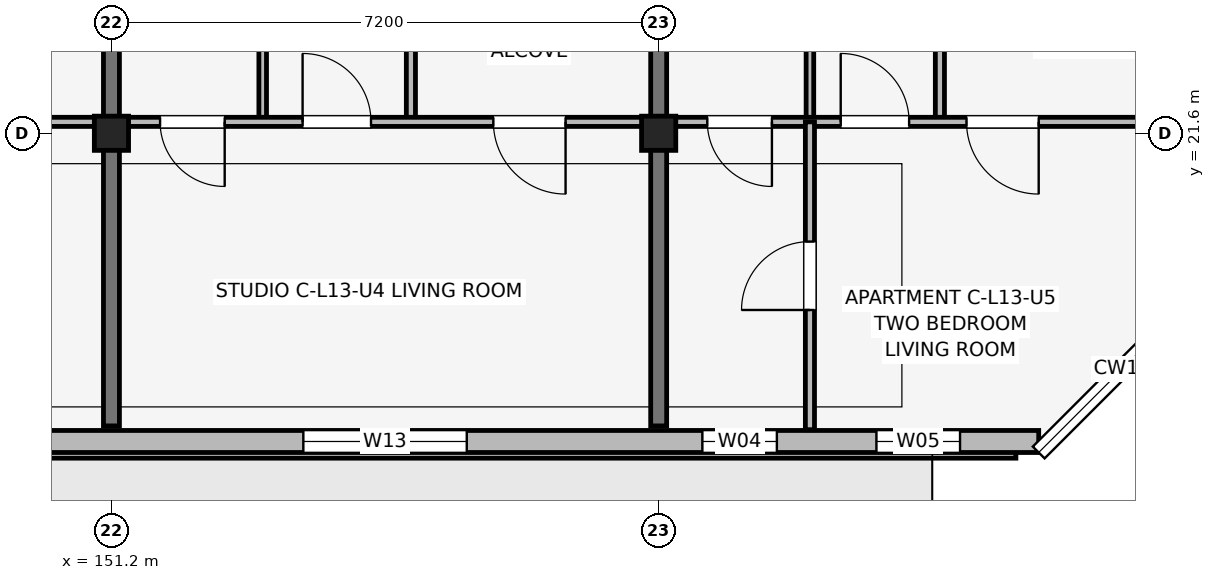
"""IFC4 building model, lengths in metres.
Left out: names, types, materials, properties, quantities, classifications, styles, units other than length and angle.
Written with IfcOpenShell. Run it as: python <this file> out.ifc"""

import sys

from ifc_helpers import new_model, si_unit, direction, frame, frame_2d, origin, origin_2d, place, context, subcontext, project, spatial, rectangle, extrude, element, fill, save


model = new_model("IFC4")
c1 = context("Model", 3, precision=1e-05, world=origin(), true_north=direction((0.0, 1.0)))
c2 = subcontext(c1, "Body", "Model", "MODEL_VIEW")
j1 = project(units=[si_unit("LENGTHUNIT", "METRE"), si_unit("PLANEANGLEUNIT", "RADIAN")], contexts=[c1])
p1 = place(None, origin())
s1 = spatial("IfcSite", under=j1, at=p1, CompositionType="ELEMENT")
p2 = place(p1, origin())
s2 = spatial("IfcBuilding", under=s1, at=p2, CompositionType="ELEMENT")
p3 = place(p2, frame((0.0, 0.0, 43.35)))
s3 = spatial("IfcBuildingStorey", under=s2, at=p3, CompositionType="ELEMENT", Elevation=43.35)
for number, where, z_axis, x_axis in (
    (1, (151.2, 21.6, 0.0), (0.0, 0.0, 1.0), (1.0, 0.0, 0.0)),
    (2, (158.4, 21.6, 0.0), (0.0, 0.0, 1.0), (1.0, 0.0, 0.0)),
):
    element("IfcColumn", number, at=place(p3, frame(where, z_axis=z_axis, x_axis=x_axis)), inside=s3, PredefinedType="COLUMN", context=c2, shape_type="SweptSolid", body=[
        extrude(rectangle(XDim=0.45, YDim=0.45, at=origin_2d()), origin(), (0.0, 0.0, 1.0), 3.15),
    ])
for number, where, z_axis, x_axis in (
    (3, (151.2, 17.75, 0.0), (0.0, 0.0, 1.0), (0.0, 1.0, 0.0)),
    (4, (158.4, 17.75, 0.0), (0.0, 0.0, 1.0), (0.0, 1.0, 0.0)),
):
    element("IfcWall", number, at=place(p3, frame(where, z_axis=z_axis, x_axis=x_axis)), inside=s3, PredefinedType="SHEAR", context=c2, shape_type="SweptSolid", body=[
        extrude(rectangle(XDim=6.4, YDim=0.21, at=frame_2d((3.2, 0.0))), origin(), (0.0, 0.0, 1.0), 3.15),
    ])
p4 = place(p3, frame((131.8, 17.545, 0.0), z_axis=(0.0, 0.0, 1.0), x_axis=(1.0, 0.0, 0.0)))
e5 = element("IfcWall", 5, at=p4, inside=s3, PredefinedType="SOLIDWALL", context=c2, shape_type="SweptSolid", body=[
    extrude(rectangle(XDim=31.6, YDim=0.29, at=frame_2d((15.8, 0.0))), origin(), (0.0, 0.0, 1.0), 2.48),
])
p5 = place(p4, frame((18.35, 0.0, 0.0), z_axis=(0.0, 0.0, 1.0), x_axis=(-1.0, 0.0, 0.0)))
e6 = element("IfcOpeningElement", 6, at=p5, cuts=e5, PredefinedType="OPENING", context=c2, shape_type="SweptSolid", body=[
    extrude(rectangle(XDim=1.9, YDim=2.2, at=frame_2d((0.95, 1.1))), frame((0.0, 0.155, 0.0), z_axis=(0.0, -1.0, 0.0), x_axis=(1.0, 0.0, 0.0)), (0.0, 0.0, 1.0), 0.31),
])
p6 = place(p4, frame((1.65, 0.0, 0.7)))
e7 = element("IfcOpeningElement", 7, at=p6, cuts=e5, PredefinedType="OPENING", context=c2, shape_type="SweptSolid", body=[
    extrude(rectangle(XDim=1.72, YDim=1.6, at=frame_2d((0.86, 0.8))), frame((0.0, 0.155, 0.0), z_axis=(0.0, -1.0, 0.0), x_axis=(1.0, 0.0, 0.0)), (0.0, 0.0, 1.0), 0.31),
])
p7 = place(p4, frame((5.89, 0.0, 0.75)))
e8 = element("IfcOpeningElement", 8, at=p7, cuts=e5, PredefinedType="OPENING", context=c2, shape_type="SweptSolid", body=[
    extrude(rectangle(XDim=0.6, YDim=1.25, at=frame_2d((0.3, 0.625))), frame((0.0, 0.155, 0.0), z_axis=(0.0, -1.0, 0.0), x_axis=(1.0, 0.0, 0.0)), (0.0, 0.0, 1.0), 0.31),
])
p8 = place(p4, frame((8.65, 0.0, 0.7)))
e9 = element("IfcOpeningElement", 9, at=p8, cuts=e5, PredefinedType="OPENING", context=c2, shape_type="SweptSolid", body=[
    extrude(rectangle(XDim=2.0, YDim=1.65, at=frame_2d((1.0, 0.825))), frame((0.0, 0.155, 0.0), z_axis=(0.0, -1.0, 0.0), x_axis=(1.0, 0.0, 0.0)), (0.0, 0.0, 1.0), 0.31),
])
p9 = place(p4, frame((21.925, 0.0, 0.7)))
e10 = element("IfcOpeningElement", 10, at=p9, cuts=e5, PredefinedType="OPENING", context=c2, shape_type="SweptSolid", body=[
    extrude(rectangle(XDim=2.15, YDim=1.65, at=frame_2d((1.075, 0.825))), frame((0.0, 0.155, 0.0), z_axis=(0.0, -1.0, 0.0), x_axis=(1.0, 0.0, 0.0)), (0.0, 0.0, 1.0), 0.31),
])
p10 = place(p4, frame((27.175, 0.0, 0.75)))
e11 = element("IfcOpeningElement", 11, at=p10, cuts=e5, PredefinedType="OPENING", context=c2, shape_type="SweptSolid", body=[
    extrude(rectangle(XDim=0.98, YDim=1.45, at=frame_2d((0.49, 0.725))), frame((0.0, 0.155, 0.0), z_axis=(0.0, -1.0, 0.0), x_axis=(1.0, 0.0, 0.0)), (0.0, 0.0, 1.0), 0.31),
])
p11 = place(p4, frame((29.465, 0.0, 0.75)))
e12 = element("IfcOpeningElement", 12, at=p11, cuts=e5, PredefinedType="OPENING", context=c2, shape_type="SweptSolid", body=[
    extrude(rectangle(XDim=1.1, YDim=1.5, at=frame_2d((0.55, 0.75))), frame((0.0, 0.155, 0.0), z_axis=(0.0, -1.0, 0.0), x_axis=(1.0, 0.0, 0.0)), (0.0, 0.0, 1.0), 0.31),
])
p12 = place(p3, frame((144.14, 21.75, 0.0), z_axis=(0.0, 0.0, 1.0), x_axis=(1.0, 0.0, 0.0)))
e13 = element("IfcWall", 13, at=p12, inside=s3, PredefinedType="PARTITIONING", context=c2, shape_type="SweptSolid", body=[
    extrude(rectangle(XDim=6.92, YDim=0.12, at=frame_2d((3.46, 0.0))), origin(), (0.0, 0.0, 1.0), 2.38),
])
p13 = place(p12, frame((1.475, 0.0, 0.0), z_axis=(0.0, 0.0, 1.0), x_axis=(-1.0, 0.0, 0.0)))
e14 = element("IfcOpeningElement", 14, at=p13, cuts=e13, PredefinedType="OPENING", context=c2, shape_type="SweptSolid", body=[
    extrude(rectangle(XDim=0.85, YDim=2.08, at=frame_2d((0.425, 1.04))), frame((0.0, 0.07, 0.0), z_axis=(0.0, -1.0, 0.0), x_axis=(1.0, 0.0, 0.0)), (0.0, 0.0, 1.0), 0.14),
])
p14 = place(p12, frame((2.625, 0.0, 0.0)))
e15 = element("IfcOpeningElement", 15, at=p14, cuts=e13, PredefinedType="OPENING", context=c2, shape_type="SweptSolid", body=[
    extrude(rectangle(XDim=0.9, YDim=2.08, at=frame_2d((0.45, 1.04))), frame((0.0, 0.07, 0.0), z_axis=(0.0, -1.0, 0.0), x_axis=(1.0, 0.0, 0.0)), (0.0, 0.0, 1.0), 0.14),
])
p15 = place(p12, frame((5.96, 0.0, 0.0), z_axis=(0.0, 0.0, 1.0), x_axis=(-1.0, 0.0, 0.0)))
e16 = element("IfcOpeningElement", 16, at=p15, cuts=e13, PredefinedType="OPENING", context=c2, shape_type="SweptSolid", body=[
    extrude(rectangle(XDim=0.95, YDim=2.08, at=frame_2d((0.475, 1.04))), frame((0.0, 0.07, 0.0), z_axis=(0.0, -1.0, 0.0), x_axis=(1.0, 0.0, 0.0)), (0.0, 0.0, 1.0), 0.14),
])
p16 = place(p3, frame((153.19, 21.75, 0.0), z_axis=(0.0, 0.0, 1.0), x_axis=(0.0, 1.0, 0.0)))
e17 = element("IfcWall", 17, at=p16, inside=s3, PredefinedType="PARTITIONING", context=c2, shape_type="SweptSolid", body=[
    extrude(rectangle(XDim=2.55, YDim=0.1, at=frame_2d((1.275, 0.0))), origin(), (0.0, 0.0, 1.0), 2.38),
])
p17 = place(p3, frame((155.14, 21.75, 0.0), z_axis=(0.0, 0.0, 1.0), x_axis=(0.0, 1.0, 0.0)))
e18 = element("IfcWall", 18, at=p17, inside=s3, PredefinedType="PARTITIONING", context=c2, shape_type="SweptSolid", body=[
    extrude(rectangle(XDim=2.55, YDim=0.12, at=frame_2d((1.275, 0.0))), origin(), (0.0, 0.0, 1.0), 2.38),
])
p18 = place(p3, frame((151.34, 21.75, 0.0), z_axis=(0.0, 0.0, 1.0), x_axis=(1.0, 0.0, 0.0)))
e19 = element("IfcWall", 19, at=p18, inside=s3, PredefinedType="PARTITIONING", context=c2, shape_type="SweptSolid", body=[
    extrude(rectangle(XDim=6.92, YDim=0.12, at=frame_2d((3.46, 0.0))), origin(), (0.0, 0.0, 1.0), 2.38),
])
p19 = place(p18, frame((1.35, 0.0, 0.0), z_axis=(0.0, 0.0, 1.0), x_axis=(-1.0, 0.0, 0.0)))
e20 = element("IfcOpeningElement", 20, at=p19, cuts=e19, PredefinedType="OPENING", context=c2, shape_type="SweptSolid", body=[
    extrude(rectangle(XDim=0.85, YDim=2.08, at=frame_2d((0.425, 1.04))), frame((0.0, 0.07, 0.0), z_axis=(0.0, -1.0, 0.0), x_axis=(1.0, 0.0, 0.0)), (0.0, 0.0, 1.0), 0.14),
])
p20 = place(p18, frame((2.375, 0.0, 0.0)))
e21 = element("IfcOpeningElement", 21, at=p20, cuts=e19, PredefinedType="OPENING", context=c2, shape_type="SweptSolid", body=[
    extrude(rectangle(XDim=0.9, YDim=2.08, at=frame_2d((0.45, 1.04))), frame((0.0, 0.07, 0.0), z_axis=(0.0, -1.0, 0.0), x_axis=(1.0, 0.0, 0.0)), (0.0, 0.0, 1.0), 0.14),
])
p21 = place(p18, frame((5.835, 0.0, 0.0), z_axis=(0.0, 0.0, 1.0), x_axis=(-1.0, 0.0, 0.0)))
e22 = element("IfcOpeningElement", 22, at=p21, cuts=e19, PredefinedType="OPENING", context=c2, shape_type="SweptSolid", body=[
    extrude(rectangle(XDim=0.95, YDim=2.08, at=frame_2d((0.475, 1.04))), frame((0.0, 0.07, 0.0), z_axis=(0.0, -1.0, 0.0), x_axis=(1.0, 0.0, 0.0)), (0.0, 0.0, 1.0), 0.14),
])
p22 = place(p3, frame((160.39, 21.75, 0.0), z_axis=(0.0, 0.0, 1.0), x_axis=(0.0, 1.0, 0.0)))
e23 = element("IfcWall", 23, at=p22, inside=s3, PredefinedType="PARTITIONING", context=c2, shape_type="SweptSolid", body=[
    extrude(rectangle(XDim=2.55, YDim=0.1, at=frame_2d((1.275, 0.0))), origin(), (0.0, 0.0, 1.0), 2.38),
])
p23 = place(p3, frame((162.1, 21.75, 0.0), z_axis=(0.0, 0.0, 1.0), x_axis=(0.0, 1.0, 0.0)))
e24 = element("IfcWall", 24, at=p23, inside=s3, PredefinedType="PARTITIONING", context=c2, shape_type="SweptSolid", body=[
    extrude(rectangle(XDim=2.55, YDim=0.12, at=frame_2d((1.275, 0.0))), origin(), (0.0, 0.0, 1.0), 2.38),
])
p24 = place(p3, frame((158.54, 21.75, 0.0), z_axis=(0.0, 0.0, 1.0), x_axis=(1.0, 0.0, 0.0)))
e25 = element("IfcWall", 25, at=p24, inside=s3, PredefinedType="PARTITIONING", context=c2, shape_type="SweptSolid", body=[
    extrude(rectangle(XDim=6.92, YDim=0.12, at=frame_2d((3.46, 0.0))), origin(), (0.0, 0.0, 1.0), 2.38),
])
p25 = place(p24, frame((1.35, 0.0, 0.0), z_axis=(0.0, 0.0, 1.0), x_axis=(-1.0, 0.0, 0.0)))
e26 = element("IfcOpeningElement", 26, at=p25, cuts=e25, PredefinedType="OPENING", context=c2, shape_type="SweptSolid", body=[
    extrude(rectangle(XDim=0.85, YDim=2.08, at=frame_2d((0.425, 1.04))), frame((0.0, 0.07, 0.0), z_axis=(0.0, -1.0, 0.0), x_axis=(1.0, 0.0, 0.0)), (0.0, 0.0, 1.0), 0.14),
])
p26 = place(p24, frame((2.255, 0.0, 0.0)))
e27 = element("IfcOpeningElement", 27, at=p26, cuts=e25, PredefinedType="OPENING", context=c2, shape_type="SweptSolid", body=[
    extrude(rectangle(XDim=0.9, YDim=2.08, at=frame_2d((0.45, 1.04))), frame((0.0, 0.07, 0.0), z_axis=(0.0, -1.0, 0.0), x_axis=(1.0, 0.0, 0.0)), (0.0, 0.0, 1.0), 0.14),
])
p27 = place(p24, frame((4.86, 0.0, 0.0), z_axis=(0.0, 0.0, 1.0), x_axis=(-1.0, 0.0, 0.0)))
e28 = element("IfcOpeningElement", 28, at=p27, cuts=e25, PredefinedType="OPENING", context=c2, shape_type="SweptSolid", body=[
    extrude(rectangle(XDim=0.95, YDim=2.08, at=frame_2d((0.475, 1.04))), frame((0.0, 0.07, 0.0), z_axis=(0.0, -1.0, 0.0), x_axis=(1.0, 0.0, 0.0)), (0.0, 0.0, 1.0), 0.14),
])
p28 = place(p3, frame((160.39, 17.7, 0.0), z_axis=(0.0, 0.0, 1.0), x_axis=(0.0, 1.0, 0.0)))
e29 = element("IfcWall", 29, at=p28, inside=s3, PredefinedType="PARTITIONING", context=c2, shape_type="SweptSolid", body=[
    extrude(rectangle(XDim=4.05, YDim=0.12, at=frame_2d((2.025, 0.0))), origin(), (0.0, 0.0, 1.0), 2.38),
])
p29 = place(p28, frame((1.575, 0.0, 0.0)))
e30 = element("IfcOpeningElement", 30, at=p29, cuts=e29, PredefinedType="OPENING", context=c2, shape_type="SweptSolid", body=[
    extrude(rectangle(XDim=0.9, YDim=2.08, at=frame_2d((0.45, 1.04))), frame((0.0, 0.07, 0.0), z_axis=(0.0, -1.0, 0.0), x_axis=(1.0, 0.0, 0.0)), (0.0, 0.0, 1.0), 0.14),
])
p30 = place(p9, origin())
e31 = element("IfcWindow", 31, at=p30, inside=s3, PartitioningType="SINGLE_PANEL", PredefinedType="WINDOW", context=c2, shape_type="SweptSolid", body=[
    extrude(rectangle(XDim=2.15, YDim=1.65, at=frame_2d((1.075, 0.825))), frame((0.0, 0.03, 0.0), z_axis=(0.0, -1.0, 0.0), x_axis=(1.0, 0.0, 0.0)), (0.0, 0.0, 1.0), 0.06),
])
fill(e10, e31)
p31 = place(p10, origin())
e32 = element("IfcWindow", 32, at=p31, inside=s3, PartitioningType="SINGLE_PANEL", PredefinedType="WINDOW", context=c2, shape_type="SweptSolid", body=[
    extrude(rectangle(XDim=0.98, YDim=1.45, at=frame_2d((0.49, 0.725))), frame((0.0, 0.03, 0.0), z_axis=(0.0, -1.0, 0.0), x_axis=(1.0, 0.0, 0.0)), (0.0, 0.0, 1.0), 0.06),
])
fill(e11, e32)
p32 = place(p11, origin())
e33 = element("IfcWindow", 33, at=p32, inside=s3, PartitioningType="SINGLE_PANEL", PredefinedType="WINDOW", context=c2, shape_type="SweptSolid", body=[
    extrude(rectangle(XDim=1.1, YDim=1.5, at=frame_2d((0.55, 0.75))), frame((0.0, 0.03, 0.0), z_axis=(0.0, -1.0, 0.0), x_axis=(1.0, 0.0, 0.0)), (0.0, 0.0, 1.0), 0.06),
])
fill(e12, e33)
p33 = place(p19, origin())
e34 = element("IfcDoor", 34, at=p33, inside=s3, OperationType="SINGLE_SWING_RIGHT", PredefinedType="DOOR", context=c2, shape_type="SweptSolid", body=[
    extrude(rectangle(XDim=0.85, YDim=2.08, at=frame_2d((0.425, 1.04))), frame((0.0, 0.025, 0.0), z_axis=(0.0, -1.0, 0.0), x_axis=(1.0, 0.0, 0.0)), (0.0, 0.0, 1.0), 0.05),
])
fill(e20, e34)
p34 = place(p20, origin())
e35 = element("IfcDoor", 35, at=p34, inside=s3, OperationType="SINGLE_SWING_LEFT", PredefinedType="DOOR", context=c2, shape_type="SweptSolid", body=[
    extrude(rectangle(XDim=0.9, YDim=2.08, at=frame_2d((0.45, 1.04))), frame((0.0, 0.025, 0.0), z_axis=(0.0, -1.0, 0.0), x_axis=(1.0, 0.0, 0.0)), (0.0, 0.0, 1.0), 0.05),
])
fill(e21, e35)
p35 = place(p21, origin())
e36 = element("IfcDoor", 36, at=p35, inside=s3, OperationType="SINGLE_SWING_RIGHT", PredefinedType="DOOR", context=c2, shape_type="SweptSolid", body=[
    extrude(rectangle(XDim=0.95, YDim=2.08, at=frame_2d((0.475, 1.04))), frame((0.0, 0.025, 0.0), z_axis=(0.0, -1.0, 0.0), x_axis=(1.0, 0.0, 0.0)), (0.0, 0.0, 1.0), 0.05),
])
fill(e22, e36)
p36 = place(p25, origin())
e37 = element("IfcDoor", 37, at=p36, inside=s3, OperationType="SINGLE_SWING_RIGHT", PredefinedType="DOOR", context=c2, shape_type="SweptSolid", body=[
    extrude(rectangle(XDim=0.85, YDim=2.08, at=frame_2d((0.425, 1.04))), frame((0.0, 0.025, 0.0), z_axis=(0.0, -1.0, 0.0), x_axis=(1.0, 0.0, 0.0)), (0.0, 0.0, 1.0), 0.05),
])
fill(e26, e37)
p37 = place(p26, origin())
e38 = element("IfcDoor", 38, at=p37, inside=s3, OperationType="SINGLE_SWING_LEFT", PredefinedType="DOOR", context=c2, shape_type="SweptSolid", body=[
    extrude(rectangle(XDim=0.9, YDim=2.08, at=frame_2d((0.45, 1.04))), frame((0.0, 0.025, 0.0), z_axis=(0.0, -1.0, 0.0), x_axis=(1.0, 0.0, 0.0)), (0.0, 0.0, 1.0), 0.05),
])
fill(e27, e38)
p38 = place(p27, origin())
e39 = element("IfcDoor", 39, at=p38, inside=s3, OperationType="SINGLE_SWING_RIGHT", PredefinedType="DOOR", context=c2, shape_type="SweptSolid", body=[
    extrude(rectangle(XDim=0.95, YDim=2.08, at=frame_2d((0.475, 1.04))), frame((0.0, 0.025, 0.0), z_axis=(0.0, -1.0, 0.0), x_axis=(1.0, 0.0, 0.0)), (0.0, 0.0, 1.0), 0.05),
])
fill(e28, e39)
p39 = place(p29, origin())
e40 = element("IfcDoor", 40, at=p39, inside=s3, OperationType="SINGLE_SWING_LEFT", PredefinedType="DOOR", context=c2, shape_type="SweptSolid", body=[
    extrude(rectangle(XDim=0.9, YDim=2.08, at=frame_2d((0.45, 1.04))), frame((0.0, 0.025, 0.0), z_axis=(0.0, -1.0, 0.0), x_axis=(1.0, 0.0, 0.0)), (0.0, 0.0, 1.0), 0.05),
])
fill(e30, e40)
save(model, sys.argv[1])
